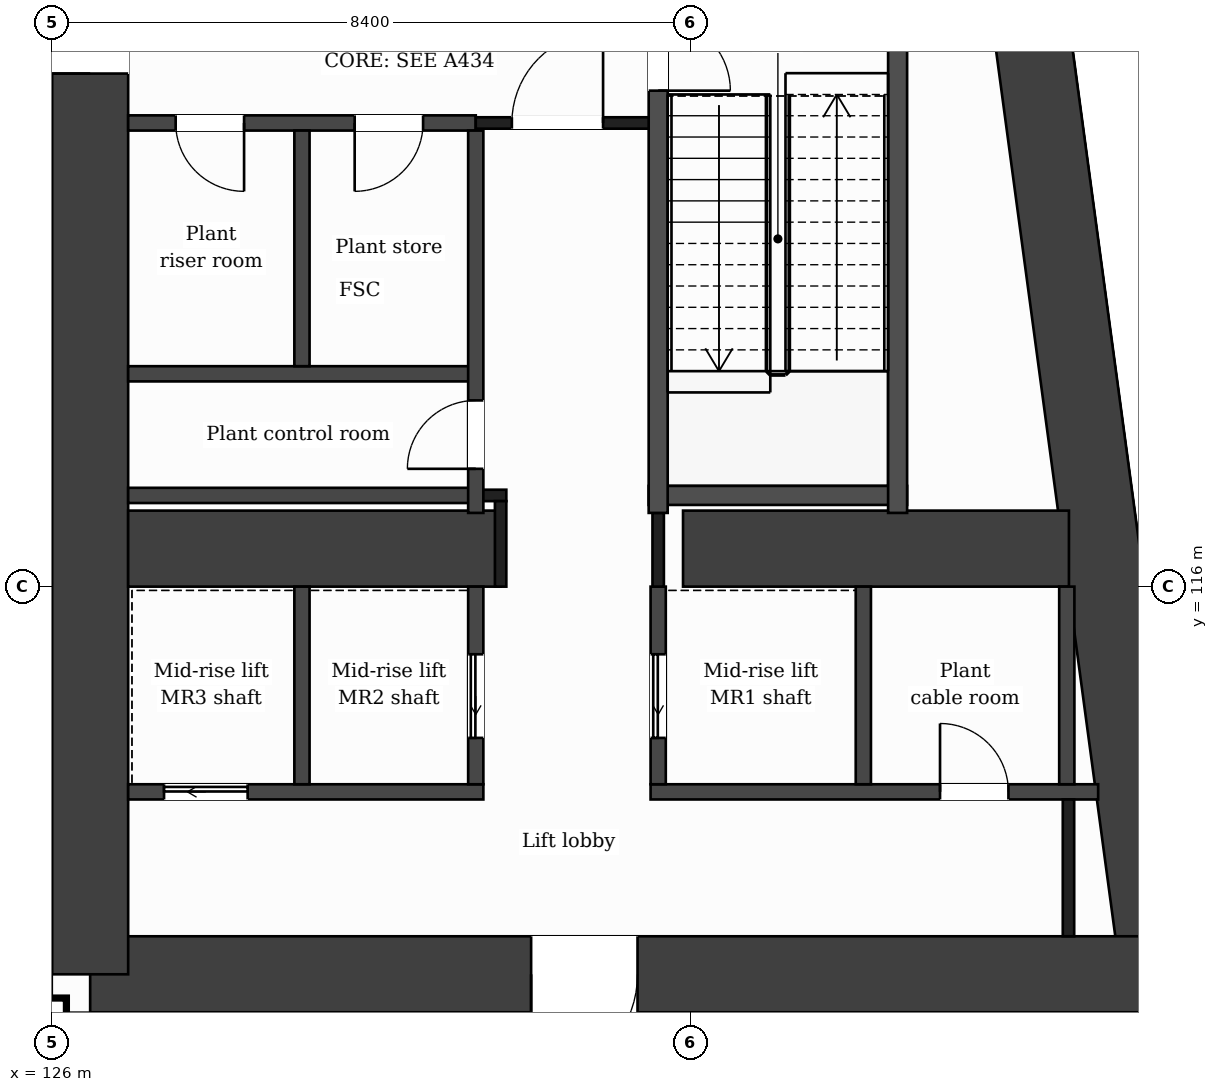
"""IFC4 building model, lengths in metres.
Left out: names, types, materials, properties, quantities, classifications, styles, units other than length and angle.
Written with IfcOpenShell. Run it as: python <this file> out.ifc"""

import sys

from ifc_helpers import new_model, si_unit, direction, frame, frame_2d, origin, place, context, subcontext, project, spatial, rectangle, extrude, element, fill, save


model = new_model("IFC4")
c1 = context("Model", 3, precision=1e-05, world=origin(), true_north=direction((0.0, 1.0)))
c2 = subcontext(c1, "Body", "Model", "MODEL_VIEW")
j1 = project(units=[si_unit("LENGTHUNIT", "METRE"), si_unit("PLANEANGLEUNIT", "RADIAN")], contexts=[c1])
p1 = place(None, origin())
s1 = spatial("IfcSite", under=j1, at=p1, CompositionType="ELEMENT")
p2 = place(p1, origin())
s2 = spatial("IfcBuilding", under=s1, at=p2, CompositionType="ELEMENT")
p3 = place(p2, frame((0.0, 0.0, 142.8)))
s3 = spatial("IfcBuildingStorey", under=s2, at=p3, CompositionType="ELEMENT", Elevation=142.8)
p4 = place(p3, frame((137.732, 131.9, 0.0), z_axis=(0.0, 0.0, 1.0), x_axis=(0.133411141623, -0.991060778808, 0.0)))
e1 = element("IfcWall", 1, at=p4, inside=s3, PredefinedType="SHEAR", context=c2, shape_type="SweptSolid", body=[
    extrude(rectangle(XDim=21.189, YDim=1.0, at=frame_2d((10.595, 0.0))), origin(), (0.0, 0.0, 1.0), 5.0),
])
p5 = place(p3, frame((140.559, 110.9, 0.0), z_axis=(0.0, 0.0, 1.0), x_axis=(-1.0, 0.0, 0.0)))
e2 = element("IfcWall", 2, at=p5, inside=s3, PredefinedType="SHEAR", context=c2, shape_type="SweptSolid", body=[
    extrude(rectangle(XDim=14.059, YDim=1.0, at=frame_2d((7.029, 0.0))), origin(), (0.0, 0.0, 1.0), 5.0),
])
p6 = place(p5, frame((6.858, 0.0, 0.0)))
e3 = element("IfcOpeningElement", 3, at=p6, cuts=e2, PredefinedType="OPENING", context=c2, shape_type="SweptSolid", body=[
    extrude(rectangle(XDim=1.4, YDim=2.1, at=frame_2d((0.7, 1.05))), frame((0.0, 0.51, 0.0), z_axis=(0.0, -1.0, 0.0), x_axis=(1.0, 0.0, 0.0)), (0.0, 0.0, 1.0), 1.02),
])
p7 = place(p3, frame((126.5, 110.9, 0.0), z_axis=(0.0, 0.0, 1.0), x_axis=(0.0, 1.0, 0.0)))
e4 = element("IfcWall", 4, at=p7, inside=s3, PredefinedType="SHEAR", context=c2, shape_type="SweptSolid", body=[
    extrude(rectangle(XDim=21.0, YDim=1.0, at=frame_2d((10.5, 0.0))), origin(), (0.0, 0.0, 1.0), 5.0),
])
p8 = place(p7, frame((17.5, 0.0, 0.0)))
e5 = element("IfcOpeningElement", 5, at=p8, cuts=e4, PredefinedType="OPENING", context=c2, shape_type="SweptSolid", body=[
    extrude(rectangle(XDim=1.2, YDim=2.1, at=frame_2d((0.6, 1.05))), frame((0.0, 0.51, 0.0), z_axis=(0.0, -1.0, 0.0), x_axis=(1.0, 0.0, 0.0)), (0.0, 0.0, 1.0), 1.02),
])
p9 = place(p7, frame((11.85, 0.0, 0.0)))
e6 = element("IfcOpeningElement", 6, at=p9, cuts=e4, PredefinedType="OPENING", context=c2, shape_type="SweptSolid", body=[
    extrude(rectangle(XDim=1.4, YDim=2.1, at=frame_2d((0.7, 1.05))), frame((0.0, 0.51, 0.0), z_axis=(0.0, -1.0, 0.0), x_axis=(1.0, 0.0, 0.0)), (0.0, 0.0, 1.0), 1.02),
])
p10 = place(p3, frame((127.0, 116.5, 0.0), z_axis=(0.0, 0.0, 1.0), x_axis=(1.0, 0.0, 0.0)))
e7 = element("IfcWall", 7, at=p10, inside=s3, PredefinedType="SHEAR", context=c2, shape_type="SweptSolid", body=[
    extrude(rectangle(XDim=4.9, YDim=1.0, at=frame_2d((2.45, 0.0))), origin(), (0.0, 0.0, 1.0), 5.0),
])
p11 = place(p3, frame((134.3, 116.5, 0.0), z_axis=(0.0, 0.0, 1.0), x_axis=(1.0, 0.0, 0.0)))
e8 = element("IfcWall", 8, at=p11, inside=s3, PredefinedType="SHEAR", context=c2, shape_type="SweptSolid", body=[
    extrude(rectangle(XDim=5.077, YDim=1.0, at=frame_2d((2.539, 0.0))), origin(), (0.0, 0.0, 1.0), 5.0),
])
p12 = place(p3, frame((140.348, 103.85, 0.0), z_axis=(0.0, 0.0, 1.0), x_axis=(-0.133431549479, 0.991058031401, 0.0)))
e9 = element("IfcWall", 9, at=p12, inside=s3, PredefinedType="SOLIDWALL", context=c2, shape_type="SweptSolid", body=[
    extrude(rectangle(XDim=6.609, YDim=0.3, at=frame_2d((3.304, 0.0))), origin(), (0.0, 0.0, 1.0), 4.68),
])
p13 = place(p12, frame((3.991, 0.0, 0.0)))
e10 = element("IfcOpeningElement", 10, at=p13, cuts=e9, PredefinedType="OPENING", context=c2, shape_type="SweptSolid", body=[
    extrude(rectangle(XDim=1.2, YDim=2.4, at=frame_2d((0.6, 1.2))), frame((0.0, 0.16, 0.0), z_axis=(0.0, -1.0, 0.0), x_axis=(1.0, 0.0, 0.0)), (0.0, 0.0, 1.0), 0.32),
])
p14 = place(p3, frame((100.7, 110.4, 0.0), z_axis=(0.0, 0.0, 1.0), x_axis=(1.0, 0.0, 0.0)))
e11 = element("IfcWall", 11, at=p14, inside=s3, PredefinedType="PARTITIONING", context=c2, shape_type="SweptSolid", body=[
    extrude(rectangle(XDim=25.4, YDim=0.2, at=frame_2d((12.7, 0.0))), origin(), (0.0, 0.0, 1.0), 4.68),
])
p15 = place(p14, frame((20.5, 0.0, 0.0)))
e12 = element("IfcOpeningElement", 12, at=p15, cuts=e11, PredefinedType="OPENING", context=c2, shape_type="SweptSolid", body=[
    extrude(rectangle(XDim=1.2, YDim=2.1, at=frame_2d((0.6, 1.05))), frame((0.0, 0.11, 0.0), z_axis=(0.0, -1.0, 0.0), x_axis=(1.0, 0.0, 0.0)), (0.0, 0.0, 1.0), 0.22),
])
p16 = place(p3, frame((127.0, 113.3, 0.0), z_axis=(0.0, 0.0, 1.0), x_axis=(1.0, 0.0, 0.0)))
e13 = element("IfcWall", 13, at=p16, inside=s3, PredefinedType="PARTITIONING", context=c2, shape_type="SweptSolid", body=[
    extrude(rectangle(XDim=4.673, YDim=0.2, at=frame_2d((2.336, 0.0))), origin(), (0.0, 0.0, 1.0), 4.68),
])
p17 = place(p16, frame((0.472, 0.0, 0.0)))
e14 = element("IfcOpeningElement", 14, at=p17, cuts=e13, PredefinedType="OPENING", context=c2, shape_type="SweptSolid", body=[
    extrude(rectangle(XDim=1.1, YDim=2.1, at=frame_2d((0.55, 1.05))), frame((0.0, 0.11, 0.0), z_axis=(0.0, -1.0, 0.0), x_axis=(1.0, 0.0, 0.0)), (0.0, 0.0, 1.0), 0.22),
])
p18 = place(p3, frame((133.873, 113.3, 0.0), z_axis=(0.0, 0.0, 1.0), x_axis=(1.0, 0.0, 0.0)))
e15 = element("IfcWall", 15, at=p18, inside=s3, PredefinedType="PARTITIONING", context=c2, shape_type="SweptSolid", body=[
    extrude(rectangle(XDim=5.888, YDim=0.2, at=frame_2d((2.944, 0.0))), origin(), (0.0, 0.0, 1.0), 4.68),
])
p19 = place(p18, frame((3.808, 0.0, 0.0)))
e16 = element("IfcOpeningElement", 16, at=p19, cuts=e15, PredefinedType="OPENING", context=c2, shape_type="SweptSolid", body=[
    extrude(rectangle(XDim=0.9, YDim=2.1, at=frame_2d((0.45, 1.05))), frame((0.0, 0.11, 0.0), z_axis=(0.0, -1.0, 0.0), x_axis=(1.0, 0.0, 0.0)), (0.0, 0.0, 1.0), 0.22),
])
p20 = place(p3, frame((127.0, 117.2, 0.0), z_axis=(0.0, 0.0, 1.0), x_axis=(1.0, 0.0, 0.0)))
e17 = element("IfcWall", 17, at=p20, inside=s3, PredefinedType="PARTITIONING", context=c2, shape_type="SweptSolid", body=[
    extrude(rectangle(XDim=4.573, YDim=0.2, at=frame_2d((2.287, 0.0))), origin(), (0.0, 0.0, 1.0), 4.68),
])
p21 = place(p3, frame((131.573, 117.2, 0.0), z_axis=(0.0, 0.0, 1.0), x_axis=(1.0, 0.0, 0.0)))
e18 = element("IfcWall", 18, at=p21, inside=s3, PredefinedType="PARTITIONING", context=c2, shape_type="SweptSolid", body=[
    extrude(rectangle(XDim=0.402, YDim=0.15, at=frame_2d((0.201, 0.0))), origin(), (0.0, 0.0, 1.0), 4.68),
])
p22 = place(p3, frame((133.848, 117.2, 0.0), z_axis=(0.0, 0.0, 1.0), x_axis=(1.0, 0.0, 0.0)))
e19 = element("IfcWall", 19, at=p22, inside=s3, PredefinedType="PARTITIONING", context=c2, shape_type="SweptSolid", body=[
    extrude(rectangle(XDim=3.4, YDim=0.25, at=frame_2d((1.7, 0.0))), origin(), (0.0, 0.0, 1.0), 4.68),
])
p23 = place(p3, frame((127.0, 118.8, 0.0), z_axis=(0.0, 0.0, 1.0), x_axis=(1.0, 0.0, 0.0)))
e20 = element("IfcWall", 20, at=p23, inside=s3, PredefinedType="PARTITIONING", context=c2, shape_type="SweptSolid", body=[
    extrude(rectangle(XDim=4.573, YDim=0.2, at=frame_2d((2.287, 0.0))), origin(), (0.0, 0.0, 1.0), 4.68),
])
p24 = place(p3, frame((100.8, 119.9, 0.0), z_axis=(0.0, 0.0, 1.0), x_axis=(1.0, 0.0, 0.0)))
e21 = element("IfcWall", 21, at=p24, inside=s3, PredefinedType="PARTITIONING", context=c2, shape_type="SweptSolid", body=[
    extrude(rectangle(XDim=25.2, YDim=0.15, at=frame_2d((12.6, 0.0))), origin(), (0.0, 0.0, 1.0), 4.68),
])
p25 = place(p24, frame((3.6, 0.0, 0.0)))
e22 = element("IfcOpeningElement", 22, at=p25, cuts=e21, PredefinedType="OPENING", context=c2, shape_type="SweptSolid", body=[
    extrude(rectangle(XDim=1.2, YDim=2.1, at=frame_2d((0.6, 1.05))), frame((0.0, 0.085, 0.0), z_axis=(0.0, -1.0, 0.0), x_axis=(1.0, 0.0, 0.0)), (0.0, 0.0, 1.0), 0.17),
])
p26 = place(p24, frame((12.0, 0.0, 0.0)))
e23 = element("IfcOpeningElement", 23, at=p26, cuts=e21, PredefinedType="OPENING", context=c2, shape_type="SweptSolid", body=[
    extrude(rectangle(XDim=1.2, YDim=2.1, at=frame_2d((0.6, 1.05))), frame((0.0, 0.085, 0.0), z_axis=(0.0, -1.0, 0.0), x_axis=(1.0, 0.0, 0.0)), (0.0, 0.0, 1.0), 0.17),
])
p27 = place(p24, frame((20.4, 0.0, 0.0)))
e24 = element("IfcOpeningElement", 24, at=p27, cuts=e21, PredefinedType="OPENING", context=c2, shape_type="SweptSolid", body=[
    extrude(rectangle(XDim=1.2, YDim=2.1, at=frame_2d((0.6, 1.05))), frame((0.0, 0.085, 0.0), z_axis=(0.0, -1.0, 0.0), x_axis=(1.0, 0.0, 0.0)), (0.0, 0.0, 1.0), 0.17),
])
p28 = place(p3, frame((127.0, 122.1, 0.0), z_axis=(0.0, 0.0, 1.0), x_axis=(1.0, 0.0, 0.0)))
e25 = element("IfcWall", 25, at=p28, inside=s3, PredefinedType="PARTITIONING", context=c2, shape_type="SweptSolid", body=[
    extrude(rectangle(XDim=4.573, YDim=0.2, at=frame_2d((2.287, 0.0))), origin(), (0.0, 0.0, 1.0), 4.68),
])
p29 = place(p28, frame((2.98, 0.0, 0.0)))
e26 = element("IfcOpeningElement", 26, at=p29, cuts=e25, PredefinedType="OPENING", context=c2, shape_type="SweptSolid", body=[
    extrude(rectangle(XDim=0.9, YDim=2.1, at=frame_2d((0.45, 1.05))), frame((0.0, 0.11, 0.0), z_axis=(0.0, -1.0, 0.0), x_axis=(1.0, 0.0, 0.0)), (0.0, 0.0, 1.0), 0.22),
])
p30 = place(p28, frame((0.625, 0.0, 0.0)))
e27 = element("IfcOpeningElement", 27, at=p30, cuts=e25, PredefinedType="OPENING", context=c2, shape_type="SweptSolid", body=[
    extrude(rectangle(XDim=0.9, YDim=2.1, at=frame_2d((0.45, 1.05))), frame((0.0, 0.11, 0.0), z_axis=(0.0, -1.0, 0.0), x_axis=(1.0, 0.0, 0.0)), (0.0, 0.0, 1.0), 0.22),
])
p31 = place(p3, frame((131.573, 122.1, 0.0), z_axis=(0.0, 0.0, 1.0), x_axis=(1.0, 0.0, 0.0)))
e28 = element("IfcWall", 28, at=p31, inside=s3, PredefinedType="PARTITIONING", context=c2, shape_type="SweptSolid", body=[
    extrude(rectangle(XDim=2.4, YDim=0.15, at=frame_2d((1.2, 0.0))), origin(), (0.0, 0.0, 1.0), 4.68),
])
p32 = place(p31, frame((0.475, 0.0, 0.0)))
e29 = element("IfcOpeningElement", 29, at=p32, cuts=e28, PredefinedType="OPENING", context=c2, shape_type="SweptSolid", body=[
    extrude(rectangle(XDim=1.2, YDim=2.1, at=frame_2d((0.6, 1.05))), frame((0.0, 0.085, 0.0), z_axis=(0.0, -1.0, 0.0), x_axis=(1.0, 0.0, 0.0)), (0.0, 0.0, 1.0), 0.17),
])
p33 = place(p3, frame((129.287, 113.4, 0.0), z_axis=(0.0, 0.0, 1.0), x_axis=(0.0, 1.0, 0.0)))
e30 = element("IfcWall", 30, at=p33, inside=s3, PredefinedType="PARTITIONING", context=c2, shape_type="SweptSolid", body=[
    extrude(rectangle(XDim=2.6, YDim=0.2, at=frame_2d((1.3, 0.0))), origin(), (0.0, 0.0, 1.0), 4.68),
])
p34 = place(p3, frame((129.287, 118.9, 0.0), z_axis=(0.0, 0.0, 1.0), x_axis=(0.0, 1.0, 0.0)))
e31 = element("IfcWall", 31, at=p34, inside=s3, PredefinedType="PARTITIONING", context=c2, shape_type="SweptSolid", body=[
    extrude(rectangle(XDim=3.1, YDim=0.2, at=frame_2d((1.55, 0.0))), origin(), (0.0, 0.0, 1.0), 4.68),
])
p35 = place(p3, frame((131.573, 113.4, 0.0), z_axis=(0.0, 0.0, 1.0), x_axis=(0.0, 1.0, 0.0)))
e32 = element("IfcWall", 32, at=p35, inside=s3, PredefinedType="PARTITIONING", context=c2, shape_type="SweptSolid", body=[
    extrude(rectangle(XDim=2.6, YDim=0.2, at=frame_2d((1.3, 0.0))), origin(), (0.0, 0.0, 1.0), 4.68),
])
p36 = place(p35, frame((0.61, 0.0, 0.0)))
e33 = element("IfcOpeningElement", 33, at=p36, cuts=e32, PredefinedType="OPENING", context=c2, shape_type="SweptSolid", body=[
    extrude(rectangle(XDim=1.1, YDim=2.1, at=frame_2d((0.55, 1.05))), frame((0.0, 0.11, 0.0), z_axis=(0.0, -1.0, 0.0), x_axis=(1.0, 0.0, 0.0)), (0.0, 0.0, 1.0), 0.22),
])
p37 = place(p3, frame((131.573, 116.97, 0.0), z_axis=(0.0, 0.0, 1.0), x_axis=(0.0, 1.0, 0.0)))
e34 = element("IfcWall", 34, at=p37, inside=s3, PredefinedType="PARTITIONING", context=c2, shape_type="SweptSolid", body=[
    extrude(rectangle(XDim=5.03, YDim=0.2, at=frame_2d((2.515, 0.0))), origin(), (0.0, 0.0, 1.0), 4.68),
])
p38 = place(p37, frame((0.58, 0.0, 0.0)))
e35 = element("IfcOpeningElement", 35, at=p38, cuts=e34, PredefinedType="OPENING", context=c2, shape_type="SweptSolid", body=[
    extrude(rectangle(XDim=0.9, YDim=2.1, at=frame_2d((0.45, 1.05))), frame((0.0, 0.11, 0.0), z_axis=(0.0, -1.0, 0.0), x_axis=(1.0, 0.0, 0.0)), (0.0, 0.0, 1.0), 0.22),
])
p39 = place(p3, frame((131.9, 116.0, 0.0), z_axis=(0.0, 0.0, 1.0), x_axis=(0.0, 1.0, 0.0)))
e36 = element("IfcWall", 36, at=p39, inside=s3, PredefinedType="PARTITIONING", context=c2, shape_type="SweptSolid", body=[
    extrude(rectangle(XDim=1.125, YDim=0.15, at=frame_2d((0.562, 0.0))), origin(), (0.0, 0.0, 1.0), 4.68),
])
p40 = place(p3, frame((133.973, 113.4, 0.0), z_axis=(0.0, 0.0, 1.0), x_axis=(0.0, 1.0, 0.0)))
e37 = element("IfcWall", 37, at=p40, inside=s3, PredefinedType="PARTITIONING", context=c2, shape_type="SweptSolid", body=[
    extrude(rectangle(XDim=2.6, YDim=0.2, at=frame_2d((1.3, 0.0))), origin(), (0.0, 0.0, 1.0), 4.68),
])
p41 = place(p40, frame((0.61, 0.0, 0.0)))
e38 = element("IfcOpeningElement", 38, at=p41, cuts=e37, PredefinedType="OPENING", context=c2, shape_type="SweptSolid", body=[
    extrude(rectangle(XDim=1.1, YDim=2.1, at=frame_2d((0.55, 1.05))), frame((0.0, 0.11, 0.0), z_axis=(0.0, -1.0, 0.0), x_axis=(1.0, 0.0, 0.0)), (0.0, 0.0, 1.0), 0.22),
])
p42 = place(p3, frame((133.973, 116.0, 0.0), z_axis=(0.0, 0.0, 1.0), x_axis=(0.0, 1.0, 0.0)))
e39 = element("IfcWall", 39, at=p42, inside=s3, PredefinedType="PARTITIONING", context=c2, shape_type="SweptSolid", body=[
    extrude(rectangle(XDim=0.97, YDim=0.15, at=frame_2d((0.485, 0.0))), origin(), (0.0, 0.0, 1.0), 4.68),
])
p43 = place(p3, frame((133.973, 116.97, 0.0), z_axis=(0.0, 0.0, 1.0), x_axis=(0.0, 1.0, 0.0)))
e40 = element("IfcWall", 40, at=p43, inside=s3, PredefinedType="PARTITIONING", context=c2, shape_type="SweptSolid", body=[
    extrude(rectangle(XDim=6.855, YDim=0.25, at=frame_2d((3.427, 0.0))), origin(), (0.0, 0.0, 1.0), 4.68),
])
p44 = place(p43, frame((5.555, 0.0, 0.0)))
e41 = element("IfcOpeningElement", 41, at=p44, cuts=e40, PredefinedType="OPENING", context=c2, shape_type="SweptSolid", body=[
    extrude(rectangle(XDim=0.95, YDim=2.1, at=frame_2d((0.475, 1.05))), frame((0.0, 0.135, 0.0), z_axis=(0.0, -1.0, 0.0), x_axis=(1.0, 0.0, 0.0)), (0.0, 0.0, 1.0), 0.27),
])
p45 = place(p3, frame((136.672, 113.4, 0.0), z_axis=(0.0, 0.0, 1.0), x_axis=(0.0, 1.0, 0.0)))
e42 = element("IfcWall", 42, at=p45, inside=s3, PredefinedType="PARTITIONING", context=c2, shape_type="SweptSolid", body=[
    extrude(rectangle(XDim=2.6, YDim=0.2, at=frame_2d((1.3, 0.0))), origin(), (0.0, 0.0, 1.0), 4.68),
])
p46 = place(p3, frame((137.123, 116.97, 0.0), z_axis=(0.0, 0.0, 1.0), x_axis=(0.0, 1.0, 0.0)))
e43 = element("IfcWall", 43, at=p46, inside=s3, PredefinedType="PARTITIONING", context=c2, shape_type="SweptSolid", body=[
    extrude(rectangle(XDim=6.855, YDim=0.25, at=frame_2d((3.427, 0.0))), origin(), (0.0, 0.0, 1.0), 4.68),
])
p47 = place(p3, frame((139.349, 113.4, 0.0), z_axis=(0.0, 0.0, 1.0), x_axis=(0.0, 1.0, 0.0)))
e44 = element("IfcWall", 44, at=p47, inside=s3, PredefinedType="PARTITIONING", context=c2, shape_type="SweptSolid", body=[
    extrude(rectangle(XDim=2.6, YDim=0.2, at=frame_2d((1.3, 0.0))), origin(), (0.0, 0.0, 1.0), 4.68),
])
p48 = place(p3, frame((139.371, 111.4, 0.0), z_axis=(0.0, 0.0, 1.0), x_axis=(0.0, 1.0, 0.0)))
e45 = element("IfcWall", 45, at=p48, inside=s3, PredefinedType="PARTITIONING", context=c2, shape_type="SweptSolid", body=[
    extrude(rectangle(XDim=1.8, YDim=0.15, at=frame_2d((0.9, 0.0))), origin(), (0.0, 0.0, 1.0), 4.68),
])
p49 = place(p32, origin())
e46 = element("IfcDoor", 46, at=p49, inside=s3, OperationType="SINGLE_SWING_RIGHT", PredefinedType="DOOR", context=c2, shape_type="SweptSolid", body=[
    extrude(rectangle(XDim=1.2, YDim=2.1, at=frame_2d((0.6, 1.05))), frame((0.0, 0.025, 0.0), z_axis=(0.0, -1.0, 0.0), x_axis=(1.0, 0.0, 0.0)), (0.0, 0.0, 1.0), 0.05),
])
fill(e29, e46)
p50 = place(p29, origin())
e47 = element("IfcDoor", 47, at=p50, inside=s3, OperationType="SINGLE_SWING_LEFT", PredefinedType="DOOR", context=c2, shape_type="SweptSolid", body=[
    extrude(rectangle(XDim=0.9, YDim=2.1, at=frame_2d((0.45, 1.05))), frame((0.0, 0.025, 0.0), z_axis=(0.0, -1.0, 0.0), x_axis=(1.0, 0.0, 0.0)), (0.0, 0.0, 1.0), 0.05),
])
fill(e26, e47)
p51 = place(p30, origin())
e48 = element("IfcDoor", 48, at=p51, inside=s3, OperationType="SINGLE_SWING_RIGHT", PredefinedType="DOOR", context=c2, shape_type="SweptSolid", body=[
    extrude(rectangle(XDim=0.9, YDim=2.1, at=frame_2d((0.45, 1.05))), frame((0.0, 0.025, 0.0), z_axis=(0.0, -1.0, 0.0), x_axis=(1.0, 0.0, 0.0)), (0.0, 0.0, 1.0), 0.05),
])
fill(e27, e48)
p52 = place(p44, origin())
e49 = element("IfcDoor", 49, at=p52, inside=s3, OperationType="SINGLE_SWING_LEFT", PredefinedType="DOOR", context=c2, shape_type="SweptSolid", body=[
    extrude(rectangle(XDim=0.95, YDim=2.1, at=frame_2d((0.475, 1.05))), frame((0.0, 0.025, 0.0), z_axis=(0.0, -1.0, 0.0), x_axis=(1.0, 0.0, 0.0)), (0.0, 0.0, 1.0), 0.05),
])
fill(e41, e49)
p53 = place(p38, origin())
e50 = element("IfcDoor", 50, at=p53, inside=s3, OperationType="SINGLE_SWING_LEFT", PredefinedType="DOOR", context=c2, shape_type="SweptSolid", body=[
    extrude(rectangle(XDim=0.9, YDim=2.1, at=frame_2d((0.45, 1.05))), frame((0.0, 0.025, 0.0), z_axis=(0.0, -1.0, 0.0), x_axis=(1.0, 0.0, 0.0)), (0.0, 0.0, 1.0), 0.05),
])
fill(e35, e50)
p54 = place(p41, origin())
e51 = element("IfcDoor", 51, at=p54, inside=s3, OperationType="SLIDING_TO_LEFT", PredefinedType="DOOR", context=c2, shape_type="SweptSolid", body=[
    extrude(rectangle(XDim=1.1, YDim=2.1, at=frame_2d((0.55, 1.05))), frame((0.0, 0.025, 0.0), z_axis=(0.0, -1.0, 0.0), x_axis=(1.0, 0.0, 0.0)), (0.0, 0.0, 1.0), 0.05),
])
fill(e38, e51)
p55 = place(p36, origin())
e52 = element("IfcDoor", 52, at=p55, inside=s3, OperationType="SLIDING_TO_LEFT", PredefinedType="DOOR", context=c2, shape_type="SweptSolid", body=[
    extrude(rectangle(XDim=1.1, YDim=2.1, at=frame_2d((0.55, 1.05))), frame((0.0, 0.025, 0.0), z_axis=(0.0, -1.0, 0.0), x_axis=(1.0, 0.0, 0.0)), (0.0, 0.0, 1.0), 0.05),
])
fill(e33, e52)
p56 = place(p17, origin())
e53 = element("IfcDoor", 53, at=p56, inside=s3, OperationType="SLIDING_TO_LEFT", PredefinedType="DOOR", context=c2, shape_type="SweptSolid", body=[
    extrude(rectangle(XDim=1.1, YDim=2.1, at=frame_2d((0.55, 1.05))), frame((0.0, 0.025, 0.0), z_axis=(0.0, -1.0, 0.0), x_axis=(1.0, 0.0, 0.0)), (0.0, 0.0, 1.0), 0.05),
])
fill(e14, e53)
p57 = place(p19, origin())
e54 = element("IfcDoor", 54, at=p57, inside=s3, OperationType="SINGLE_SWING_LEFT", PredefinedType="DOOR", context=c2, shape_type="SweptSolid", body=[
    extrude(rectangle(XDim=0.9, YDim=2.1, at=frame_2d((0.45, 1.05))), frame((0.0, 0.025, 0.0), z_axis=(0.0, -1.0, 0.0), x_axis=(1.0, 0.0, 0.0)), (0.0, 0.0, 1.0), 0.05),
])
fill(e16, e54)
p58 = place(p6, origin())
e55 = element("IfcDoor", 55, at=p58, inside=s3, OperationType="SINGLE_SWING_RIGHT", PredefinedType="DOOR", context=c2, shape_type="SweptSolid", body=[
    extrude(rectangle(XDim=1.4, YDim=2.1, at=frame_2d((0.7, 1.05))), frame((0.0, 0.025, 0.0), z_axis=(0.0, -1.0, 0.0), x_axis=(1.0, 0.0, 0.0)), (0.0, 0.0, 1.0), 0.05),
])
fill(e3, e55)
p59 = place(p9, origin())
e56 = element("IfcDoor", 56, at=p59, inside=s3, OperationType="SINGLE_SWING_LEFT", PredefinedType="DOOR", context=c2, shape_type="SweptSolid", body=[
    extrude(rectangle(XDim=1.4, YDim=2.1, at=frame_2d((0.7, 1.05))), frame((0.0, 0.025, 0.0), z_axis=(0.0, -1.0, 0.0), x_axis=(1.0, 0.0, 0.0)), (0.0, 0.0, 1.0), 0.05),
])
fill(e6, e56)
save(model, sys.argv[1])
